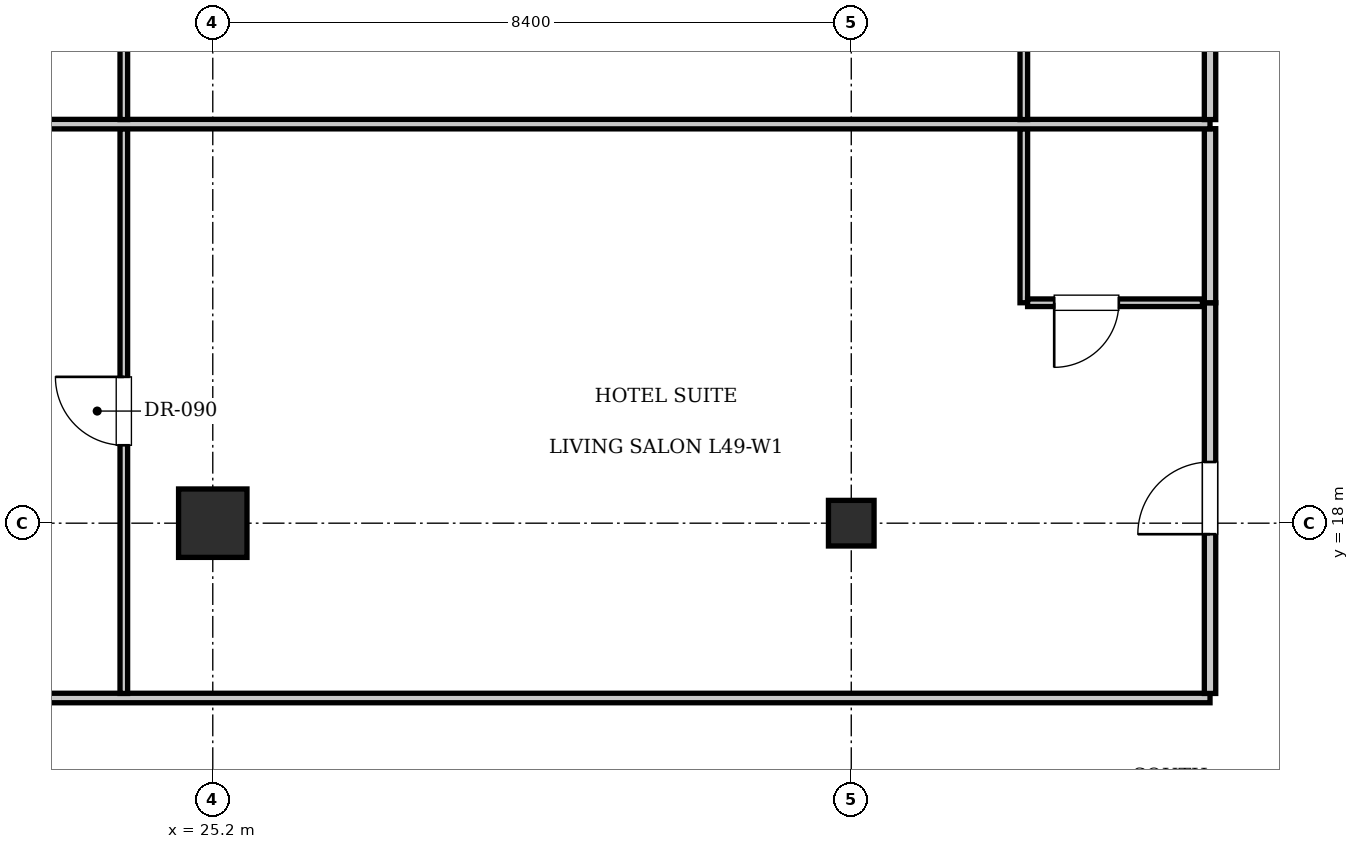
"""IFC4 building model, lengths in metres.
Left out: names, types, materials, properties, quantities, classifications, styles, units other than length and angle.
Written with IfcOpenShell. Run it as: python <this file> out.ifc"""

import sys

from ifc_helpers import new_model, si_unit, direction, frame, frame_2d, origin, origin_2d, place, context, subcontext, project, spatial, rectangle, i_section, extrude, element, fill, save


model = new_model("IFC4")
c1 = context("Model", 3, precision=1e-05, world=origin(), true_north=direction((0.0, 1.0)))
c2 = subcontext(c1, "Body", "Model", "MODEL_VIEW")
j1 = project(units=[si_unit("LENGTHUNIT", "METRE"), si_unit("PLANEANGLEUNIT", "RADIAN")], contexts=[c1])
p1 = place(None, origin())
s1 = spatial("IfcSite", under=j1, at=p1, CompositionType="ELEMENT")
p2 = place(p1, origin())
s2 = spatial("IfcBuilding", under=s1, at=p2, CompositionType="ELEMENT")
p3 = place(p2, frame((0.0, 0.0, 200.55)))
s3 = spatial("IfcBuildingStorey", under=s2, at=p3, CompositionType="ELEMENT", Elevation=200.55)
p4 = place(p3, frame((25.2, 18.0, 0.0), z_axis=(0.0, 0.0, 1.0), x_axis=(1.0, 0.0, 0.0)))
e1 = element("IfcColumn", 1, at=p4, inside=s3, PredefinedType="COLUMN", context=c2, shape_type="SweptSolid", body=[
    extrude(rectangle(XDim=0.9, YDim=0.9, at=origin_2d()), origin(), (0.0, 0.0, 1.0), 3.85),
])
p5 = place(p3, frame((33.6, 18.0, 0.0), z_axis=(0.0, 0.0, 1.0), x_axis=(1.0, 0.0, 0.0)))
e2 = element("IfcColumn", 2, at=p5, inside=s3, PredefinedType="COLUMN", context=c2, shape_type="SweptSolid", body=[
    extrude(i_section(OverallWidth=0.6, OverallDepth=0.6, WebThickness=0.025, FlangeThickness=0.038, at=origin_2d()), origin(), (0.0, 0.0, 1.0), 3.85),
])
p6 = place(p3, frame((13.2, 15.7, 0.0), z_axis=(0.0, 0.0, 1.0), x_axis=(1.0, 0.0, 0.0)))
e3 = element("IfcWall", 3, at=p6, inside=s3, PredefinedType="PARTITIONING", context=c2, shape_type="SweptSolid", body=[
    extrude(rectangle(XDim=25.12, YDim=0.125, at=frame_2d((12.56, 0.0))), origin(), (0.0, 0.0, 1.0), 3.61),
])
p7 = place(p3, frame((38.32, 15.76, 0.0), z_axis=(0.0, 0.0, 1.0), x_axis=(0.0, 1.0, 0.0)))
e4 = element("IfcWall", 4, at=p7, inside=s3, PredefinedType="PARTITIONING", context=c2, shape_type="SweptSolid", body=[
    extrude(rectangle(XDim=5.14, YDim=0.15, at=frame_2d((2.57, 0.0))), origin(), (0.0, 0.0, 1.0), 3.61),
])
p8 = place(p7, frame((2.095, 0.0, 0.0)))
e5 = element("IfcOpeningElement", 5, at=p8, cuts=e4, PredefinedType="OPENING", context=c2, shape_type="SweptSolid", body=[
    extrude(rectangle(XDim=0.95, YDim=2.15, at=frame_2d((0.475, 1.075))), frame((0.0, 0.085, 0.0), z_axis=(0.0, -1.0, 0.0), x_axis=(1.0, 0.0, 0.0)), (0.0, 0.0, 1.0), 0.17),
])
p9 = place(p3, frame((38.32, 20.9, 0.0), z_axis=(0.0, 0.0, 1.0), x_axis=(0.0, 1.0, 0.0)))
e6 = element("IfcWall", 6, at=p9, inside=s3, PredefinedType="PARTITIONING", context=c2, shape_type="SweptSolid", body=[
    extrude(rectangle(XDim=2.29, YDim=0.15, at=frame_2d((1.145, 0.0))), origin(), (0.0, 0.0, 1.0), 3.61),
])
p10 = place(p3, frame((35.87, 20.9, 0.0), z_axis=(0.0, 0.0, 1.0), x_axis=(0.0, 1.0, 0.0)))
e7 = element("IfcWall", 7, at=p10, inside=s3, PredefinedType="PARTITIONING", context=c2, shape_type="SweptSolid", body=[
    extrude(rectangle(XDim=2.29, YDim=0.1, at=frame_2d((1.145, 0.0))), origin(), (0.0, 0.0, 1.0), 3.61),
])
p11 = place(p3, frame((35.92, 20.9, 0.0), z_axis=(0.0, 0.0, 1.0), x_axis=(1.0, 0.0, 0.0)))
e8 = element("IfcWall", 8, at=p11, inside=s3, PredefinedType="PARTITIONING", context=c2, shape_type="SweptSolid", body=[
    extrude(rectangle(XDim=2.3, YDim=0.1, at=frame_2d((1.15, 0.0))), origin(), (0.0, 0.0, 1.0), 3.61),
])
p12 = place(p11, frame((0.35, 0.0, 0.0)))
e9 = element("IfcOpeningElement", 9, at=p12, cuts=e8, PredefinedType="OPENING", context=c2, shape_type="SweptSolid", body=[
    extrude(rectangle(XDim=0.85, YDim=2.1, at=frame_2d((0.425, 1.05))), frame((0.0, 0.06, 0.0), z_axis=(0.0, -1.0, 0.0), x_axis=(1.0, 0.0, 0.0)), (0.0, 0.0, 1.0), 0.12),
])
p13 = place(p3, frame((24.03, 15.76, 0.0), z_axis=(0.0, 0.0, 1.0), x_axis=(0.0, 1.0, 0.0)))
e10 = element("IfcWall", 10, at=p13, inside=s3, PredefinedType="PARTITIONING", context=c2, shape_type="SweptSolid", body=[
    extrude(rectangle(XDim=7.43, YDim=0.1, at=frame_2d((3.715, 0.0))), origin(), (0.0, 0.0, 1.0), 3.61),
])
p14 = place(p13, frame((3.265, 0.0, 0.0)))
e11 = element("IfcOpeningElement", 11, at=p14, cuts=e10, PredefinedType="OPENING", context=c2, shape_type="SweptSolid", body=[
    extrude(rectangle(XDim=0.9, YDim=2.1, at=frame_2d((0.45, 1.05))), frame((0.0, 0.06, 0.0), z_axis=(0.0, -1.0, 0.0), x_axis=(1.0, 0.0, 0.0)), (0.0, 0.0, 1.0), 0.12),
])
p15 = place(p3, frame((13.2, 23.25, 0.0), z_axis=(0.0, 0.0, 1.0), x_axis=(1.0, 0.0, 0.0)))
e12 = element("IfcWall", 12, at=p15, inside=s3, PredefinedType="PARTITIONING", context=c2, shape_type="SweptSolid", body=[
    extrude(rectangle(XDim=25.12, YDim=0.125, at=frame_2d((12.56, 0.0))), origin(), (0.0, 0.0, 1.0), 3.61),
])
p16 = place(p3, frame((38.32, 23.31, 0.0), z_axis=(0.0, 0.0, 1.0), x_axis=(0.0, 1.0, 0.0)))
e13 = element("IfcWall", 13, at=p16, inside=s3, PredefinedType="PARTITIONING", context=c2, shape_type="SweptSolid", body=[
    extrude(rectangle(XDim=2.29, YDim=0.15, at=frame_2d((1.145, 0.0))), origin(), (0.0, 0.0, 1.0), 3.61),
])
p17 = place(p3, frame((35.87, 23.31, 0.0), z_axis=(0.0, 0.0, 1.0), x_axis=(0.0, 1.0, 0.0)))
e14 = element("IfcWall", 14, at=p17, inside=s3, PredefinedType="PARTITIONING", context=c2, shape_type="SweptSolid", body=[
    extrude(rectangle(XDim=2.29, YDim=0.1, at=frame_2d((1.145, 0.0))), origin(), (0.0, 0.0, 1.0), 3.61),
])
p18 = place(p3, frame((24.03, 23.31, 0.0), z_axis=(0.0, 0.0, 1.0), x_axis=(0.0, 1.0, 0.0)))
e15 = element("IfcWall", 15, at=p18, inside=s3, PredefinedType="PARTITIONING", context=c2, shape_type="SweptSolid", body=[
    extrude(rectangle(XDim=7.43, YDim=0.1, at=frame_2d((3.715, 0.0))), origin(), (0.0, 0.0, 1.0), 3.61),
])
p19 = place(p18, frame((4.945, 0.0, 0.0)))
e16 = element("IfcOpeningElement", 16, at=p19, cuts=e15, PredefinedType="OPENING", context=c2, shape_type="SweptSolid", body=[
    extrude(rectangle(XDim=0.9, YDim=2.1, at=frame_2d((0.45, 1.05))), frame((0.0, 0.06, 0.0), z_axis=(0.0, -1.0, 0.0), x_axis=(1.0, 0.0, 0.0)), (0.0, 0.0, 1.0), 0.12),
])
p20 = place(p12, frame((0.85, 0.0, 0.0), z_axis=(0.0, 0.0, 1.0), x_axis=(-1.0, 0.0, 0.0)))
e17 = element("IfcDoor", 17, at=p20, inside=s3, OperationType="SINGLE_SWING_RIGHT", PredefinedType="DOOR", context=c2, shape_type="SweptSolid", body=[
    extrude(rectangle(XDim=0.85, YDim=2.1, at=frame_2d((0.425, 1.05))), frame((0.0, 0.025, 0.0), z_axis=(0.0, -1.0, 0.0), x_axis=(1.0, 0.0, 0.0)), (0.0, 0.0, 1.0), 0.05),
])
fill(e9, e17)
p21 = place(p8, origin())
e18 = element("IfcDoor", 18, at=p21, inside=s3, OperationType="SINGLE_SWING_LEFT", PredefinedType="DOOR", context=c2, shape_type="SweptSolid", body=[
    extrude(rectangle(XDim=0.95, YDim=2.15, at=frame_2d((0.475, 1.075))), frame((0.0, 0.025, 0.0), z_axis=(0.0, -1.0, 0.0), x_axis=(1.0, 0.0, 0.0)), (0.0, 0.0, 1.0), 0.05),
])
fill(e5, e18)
p22 = place(p14, origin())
e19 = element("IfcDoor", 19, at=p22, inside=s3, OperationType="SINGLE_SWING_RIGHT", PredefinedType="DOOR", context=c2, shape_type="SweptSolid", body=[
    extrude(rectangle(XDim=0.9, YDim=2.1, at=frame_2d((0.45, 1.05))), frame((0.0, 0.025, 0.0), z_axis=(0.0, -1.0, 0.0), x_axis=(1.0, 0.0, 0.0)), (0.0, 0.0, 1.0), 0.05),
])
fill(e11, e19)
save(model, sys.argv[1])
